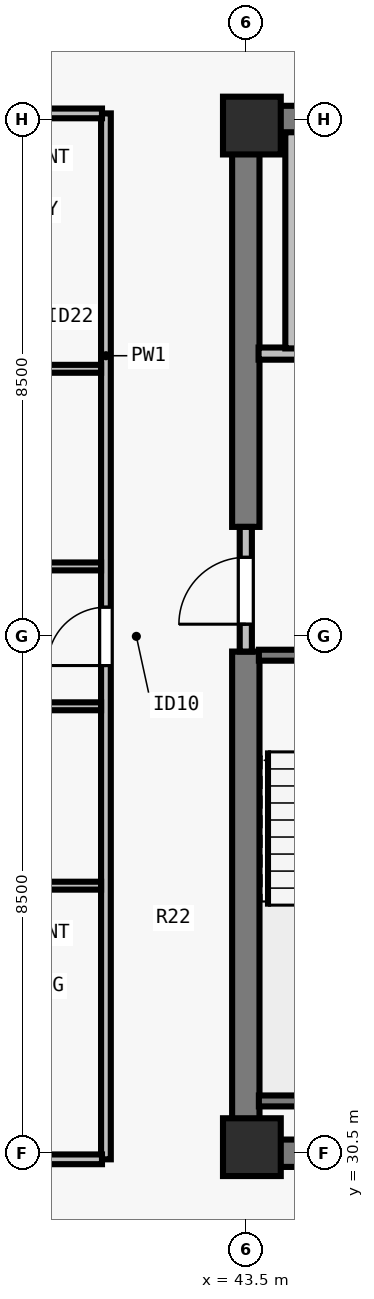
"""IFC4 building model, lengths in metres.
Left out: names, types, materials, properties, quantities, classifications, styles, units other than length and angle.
Written with IfcOpenShell. Run it as: python <this file> out.ifc"""

import sys

from ifc_helpers import new_model, si_unit, direction, frame, frame_2d, origin, origin_2d, place, context, subcontext, project, spatial, rectangle, extrude, element, fill, save


model = new_model("IFC4")
c1 = context("Model", 3, precision=1e-05, world=origin(), true_north=direction((0.0, 1.0)))
c2 = subcontext(c1, "Body", "Model", "MODEL_VIEW")
j1 = project(units=[si_unit("LENGTHUNIT", "METRE"), si_unit("PLANEANGLEUNIT", "RADIAN")], contexts=[c1])
p1 = place(None, origin())
s1 = spatial("IfcSite", under=j1, at=p1, CompositionType="ELEMENT")
p2 = place(p1, origin())
s2 = spatial("IfcBuilding", under=s1, at=p2, CompositionType="ELEMENT")
p3 = place(p2, frame((0.0, 0.0, 255.0)))
s3 = spatial("IfcBuildingStorey", under=s2, at=p3, CompositionType="ELEMENT", Elevation=255.0)
for number, where, z_axis, x_axis in (
    (1, (43.6, 30.6, 0.0), (0.0, 0.0, 1.0), (1.0, 0.0, 0.0)),
    (2, (43.6, 47.4, 0.0), (0.0, 0.0, 1.0), (1.0, 0.0, 0.0)),
):
    element("IfcColumn", number, at=place(p3, frame(where, z_axis=z_axis, x_axis=x_axis)), inside=s3, PredefinedType="COLUMN", context=c2, shape_type="SweptSolid", body=[
        extrude(rectangle(XDim=0.95, YDim=0.95, at=origin_2d()), origin(), (0.0, 0.0, 1.0), 3.5),
    ])
for number, where, z_axis, x_axis in (
    (3, (43.275, 30.5, 0.0), (0.0, 0.0, 1.0), (1.0, 0.0, 0.0)),
    (4, (43.275, 47.5, 0.0), (0.0, 0.0, 1.0), (1.0, 0.0, 0.0)),
):
    element("IfcWall", number, at=place(p3, frame(where, z_axis=z_axis, x_axis=x_axis)), inside=s3, PredefinedType="SHEAR", context=c2, shape_type="SweptSolid", body=[
        extrude(rectangle(XDim=17.45, YDim=0.45, at=frame_2d((8.725, 0.0))), origin(), (0.0, 0.0, 1.0), 3.29),
    ])
p4 = place(p3, frame((43.5, 30.715, 0.0), z_axis=(0.0, 0.0, 1.0), x_axis=(0.0, 1.0, 0.0)))
e5 = element("IfcWall", 5, at=p4, inside=s3, PredefinedType="SHEAR", context=c2, shape_type="SweptSolid", body=[
    extrude(rectangle(XDim=8.035, YDim=0.45, at=frame_2d((4.018, 0.0))), origin(), (0.0, 0.0, 1.0), 3.29),
])
p5 = place(p3, frame((43.5, 40.8, 0.0), z_axis=(0.0, 0.0, 1.0), x_axis=(0.0, 1.0, 0.0)))
e6 = element("IfcWall", 6, at=p5, inside=s3, PredefinedType="SHEAR", context=c2, shape_type="SweptSolid", body=[
    extrude(rectangle(XDim=6.485, YDim=0.45, at=frame_2d((3.242, 0.0))), origin(), (0.0, 0.0, 1.0), 3.29),
])
p6 = place(p3, frame((43.5, 38.75, 0.0), z_axis=(0.0, 0.0, 1.0), x_axis=(0.0, 1.0, 0.0)))
e7 = element("IfcWall", 7, at=p6, inside=s3, PredefinedType="SOLIDWALL", context=c2, shape_type="SweptSolid", body=[
    extrude(rectangle(XDim=2.05, YDim=0.2, at=frame_2d((1.025, 0.0))), origin(), (0.0, 0.0, 1.0), 3.29),
])
p7 = place(p6, frame((0.45, 0.0, 0.0)))
e8 = element("IfcOpeningElement", 8, at=p7, cuts=e7, PredefinedType="OPENING", context=c2, shape_type="SweptSolid", body=[
    extrude(rectangle(XDim=1.1, YDim=2.15, at=frame_2d((0.55, 1.075))), frame((0.0, 0.11, 0.0), z_axis=(0.0, -1.0, 0.0), x_axis=(1.0, 0.0, 0.0)), (0.0, 0.0, 1.0), 0.22),
])
p8 = place(p3, frame((43.71, 43.65, 0.0), z_axis=(0.0, 0.0, 1.0), x_axis=(1.0, 0.0, 0.0)))
e9 = element("IfcWall", 9, at=p8, inside=s3, PredefinedType="SOLIDWALL", context=c2, shape_type="SweptSolid", body=[
    extrude(rectangle(XDim=3.555, YDim=0.2, at=frame_2d((1.777, 0.0))), origin(), (0.0, 0.0, 1.0), 3.29),
])
p9 = place(p8, frame((1.16, 0.0, 0.0)))
e10 = element("IfcOpeningElement", 10, at=p9, cuts=e9, PredefinedType="OPENING", context=c2, shape_type="SweptSolid", body=[
    extrude(rectangle(XDim=1.1, YDim=2.2, at=frame_2d((0.55, 1.1))), frame((0.0, 0.11, 0.0), z_axis=(0.0, -1.0, 0.0), x_axis=(1.0, 0.0, 0.0)), (0.0, 0.0, 1.0), 0.22),
])
p10 = place(p3, frame((44.25, 43.735, 0.0), z_axis=(0.0, 0.0, 1.0), x_axis=(0.0, 1.0, 0.0)))
e11 = element("IfcWall", 11, at=p10, inside=s3, PredefinedType="SOLIDWALL", context=c2, shape_type="SweptSolid", body=[
    extrude(rectangle(XDim=3.555, YDim=0.2, at=frame_2d((1.777, 0.0))), origin(), (0.0, 0.0, 1.0), 3.29),
])
p11 = place(p3, frame((41.2, 30.4, 0.0), z_axis=(0.0, 0.0, 1.0), x_axis=(0.0, 1.0, 0.0)))
e12 = element("IfcWall", 12, at=p11, inside=s3, PredefinedType="PARTITIONING", context=c2, shape_type="SweptSolid", body=[
    extrude(rectangle(XDim=17.2, YDim=0.16, at=frame_2d((8.6, 0.0))), origin(), (0.0, 0.0, 1.0), 3.29),
])
p12 = place(p11, frame((8.12, 0.0, 0.0)))
e13 = element("IfcOpeningElement", 13, at=p12, cuts=e12, PredefinedType="OPENING", context=c2, shape_type="SweptSolid", body=[
    extrude(rectangle(XDim=0.96, YDim=2.18, at=frame_2d((0.48, 1.09))), frame((0.0, 0.09, 0.0), z_axis=(0.0, -1.0, 0.0), x_axis=(1.0, 0.0, 0.0)), (0.0, 0.0, 1.0), 0.18),
])
p13 = place(p3, frame((29.77, 30.4, 0.0), z_axis=(0.0, 0.0, 1.0), x_axis=(1.0, 0.0, 0.0)))
e14 = element("IfcWall", 14, at=p13, inside=s3, PredefinedType="PARTITIONING", context=c2, shape_type="SweptSolid", body=[
    extrude(rectangle(XDim=11.365, YDim=0.16, at=frame_2d((5.683, 0.0))), origin(), (0.0, 0.0, 1.0), 3.29),
])
p14 = place(p3, frame((29.805, 47.6, 0.0), z_axis=(0.0, 0.0, 1.0), x_axis=(1.0, 0.0, 0.0)))
e15 = element("IfcWall", 15, at=p14, inside=s3, PredefinedType="PARTITIONING", context=c2, shape_type="SweptSolid", body=[
    extrude(rectangle(XDim=11.33, YDim=0.16, at=frame_2d((5.665, 0.0))), origin(), (0.0, 0.0, 1.0), 3.29),
])
p15 = place(p3, frame((38.37, 34.9, 0.0), z_axis=(0.0, 0.0, 1.0), x_axis=(1.0, 0.0, 0.0)))
e16 = element("IfcWall", 16, at=p15, inside=s3, PredefinedType="PLUMBINGWALL", context=c2, shape_type="SweptSolid", body=[
    extrude(rectangle(XDim=2.75, YDim=0.13, at=frame_2d((1.375, 0.0))), origin(), (0.0, 0.0, 1.0), 3.29),
])
p16 = place(p3, frame((38.37, 37.85, 0.0), z_axis=(0.0, 0.0, 1.0), x_axis=(1.0, 0.0, 0.0)))
e17 = element("IfcWall", 17, at=p16, inside=s3, PredefinedType="PLUMBINGWALL", context=c2, shape_type="SweptSolid", body=[
    extrude(rectangle(XDim=2.75, YDim=0.13, at=frame_2d((1.375, 0.0))), origin(), (0.0, 0.0, 1.0), 3.29),
])
p17 = place(p16, frame((0.55, 0.0, 0.0)))
e18 = element("IfcOpeningElement", 18, at=p17, cuts=e17, PredefinedType="OPENING", context=c2, shape_type="SweptSolid", body=[
    extrude(rectangle(XDim=0.85, YDim=2.08, at=frame_2d((0.425, 1.04))), frame((0.0, 0.075, 0.0), z_axis=(0.0, -1.0, 0.0), x_axis=(1.0, 0.0, 0.0)), (0.0, 0.0, 1.0), 0.15),
])
p18 = place(p3, frame((38.37, 43.4, 0.0), z_axis=(0.0, 0.0, 1.0), x_axis=(1.0, 0.0, 0.0)))
e19 = element("IfcWall", 19, at=p18, inside=s3, PredefinedType="PLUMBINGWALL", context=c2, shape_type="SweptSolid", body=[
    extrude(rectangle(XDim=2.75, YDim=0.13, at=frame_2d((1.375, 0.0))), origin(), (0.0, 0.0, 1.0), 2.958),
])
p19 = place(p3, frame((38.37, 40.15, 0.0), z_axis=(0.0, 0.0, 1.0), x_axis=(1.0, 0.0, 0.0)))
e20 = element("IfcWall", 20, at=p19, inside=s3, PredefinedType="PLUMBINGWALL", context=c2, shape_type="SweptSolid", body=[
    extrude(rectangle(XDim=2.75, YDim=0.13, at=frame_2d((1.375, 0.0))), origin(), (0.0, 0.0, 1.0), 3.29),
])
p20 = place(p19, frame((0.55, 0.0, 0.0)))
e21 = element("IfcOpeningElement", 21, at=p20, cuts=e20, PredefinedType="OPENING", context=c2, shape_type="SweptSolid", body=[
    extrude(rectangle(XDim=0.88, YDim=2.1, at=frame_2d((0.44, 1.05))), frame((0.0, 0.075, 0.0), z_axis=(0.0, -1.0, 0.0), x_axis=(1.0, 0.0, 0.0)), (0.0, 0.0, 1.0), 0.15),
])
p21 = place(p3, frame((43.715, 38.69, 0.0), z_axis=(0.0, 0.0, 1.0), x_axis=(1.0, 0.0, 0.0)))
e22 = element("IfcWall", 22, at=p21, inside=s3, PredefinedType="SOLIDWALL", context=c2, shape_type="SweptSolid", body=[
    extrude(rectangle(XDim=3.28, YDim=0.18, at=frame_2d((1.64, 0.0))), origin(), (0.0, 0.0, 1.0), 3.29),
])
p22 = place(p21, frame((1.165, 0.0, 0.0)))
e23 = element("IfcOpeningElement", 23, at=p22, cuts=e22, PredefinedType="OPENING", context=c2, shape_type="SweptSolid", body=[
    extrude(rectangle(XDim=0.95, YDim=2.15, at=frame_2d((0.475, 1.075))), frame((0.0, 0.1, 0.0), z_axis=(0.0, -1.0, 0.0), x_axis=(1.0, 0.0, 0.0)), (0.0, 0.0, 1.0), 0.2),
])
p23 = place(p3, frame((43.715, 31.36, 0.0), z_axis=(0.0, 0.0, 1.0), x_axis=(1.0, 0.0, 0.0)))
e24 = element("IfcWall", 24, at=p23, inside=s3, PredefinedType="SOLIDWALL", context=c2, shape_type="SweptSolid", body=[
    extrude(rectangle(XDim=3.28, YDim=0.18, at=frame_2d((1.64, 0.0))), origin(), (0.0, 0.0, 1.0), 3.29),
])
p24 = place(p7, origin())
e25 = element("IfcDoor", 25, at=p24, inside=s3, OperationType="SINGLE_SWING_LEFT", PredefinedType="DOOR", context=c2, shape_type="SweptSolid", body=[
    extrude(rectangle(XDim=1.1, YDim=2.15, at=frame_2d((0.55, 1.075))), frame((0.0, 0.025, 0.0), z_axis=(0.0, -1.0, 0.0), x_axis=(1.0, 0.0, 0.0)), (0.0, 0.0, 1.0), 0.05),
])
fill(e8, e25)
p25 = place(p12, origin())
e26 = element("IfcDoor", 26, at=p25, inside=s3, OperationType="SINGLE_SWING_LEFT", PredefinedType="DOOR", context=c2, shape_type="SweptSolid", body=[
    extrude(rectangle(XDim=0.96, YDim=2.18, at=frame_2d((0.48, 1.09))), frame((0.0, 0.025, 0.0), z_axis=(0.0, -1.0, 0.0), x_axis=(1.0, 0.0, 0.0)), (0.0, 0.0, 1.0), 0.05),
])
fill(e13, e26)
save(model, sys.argv[1])
